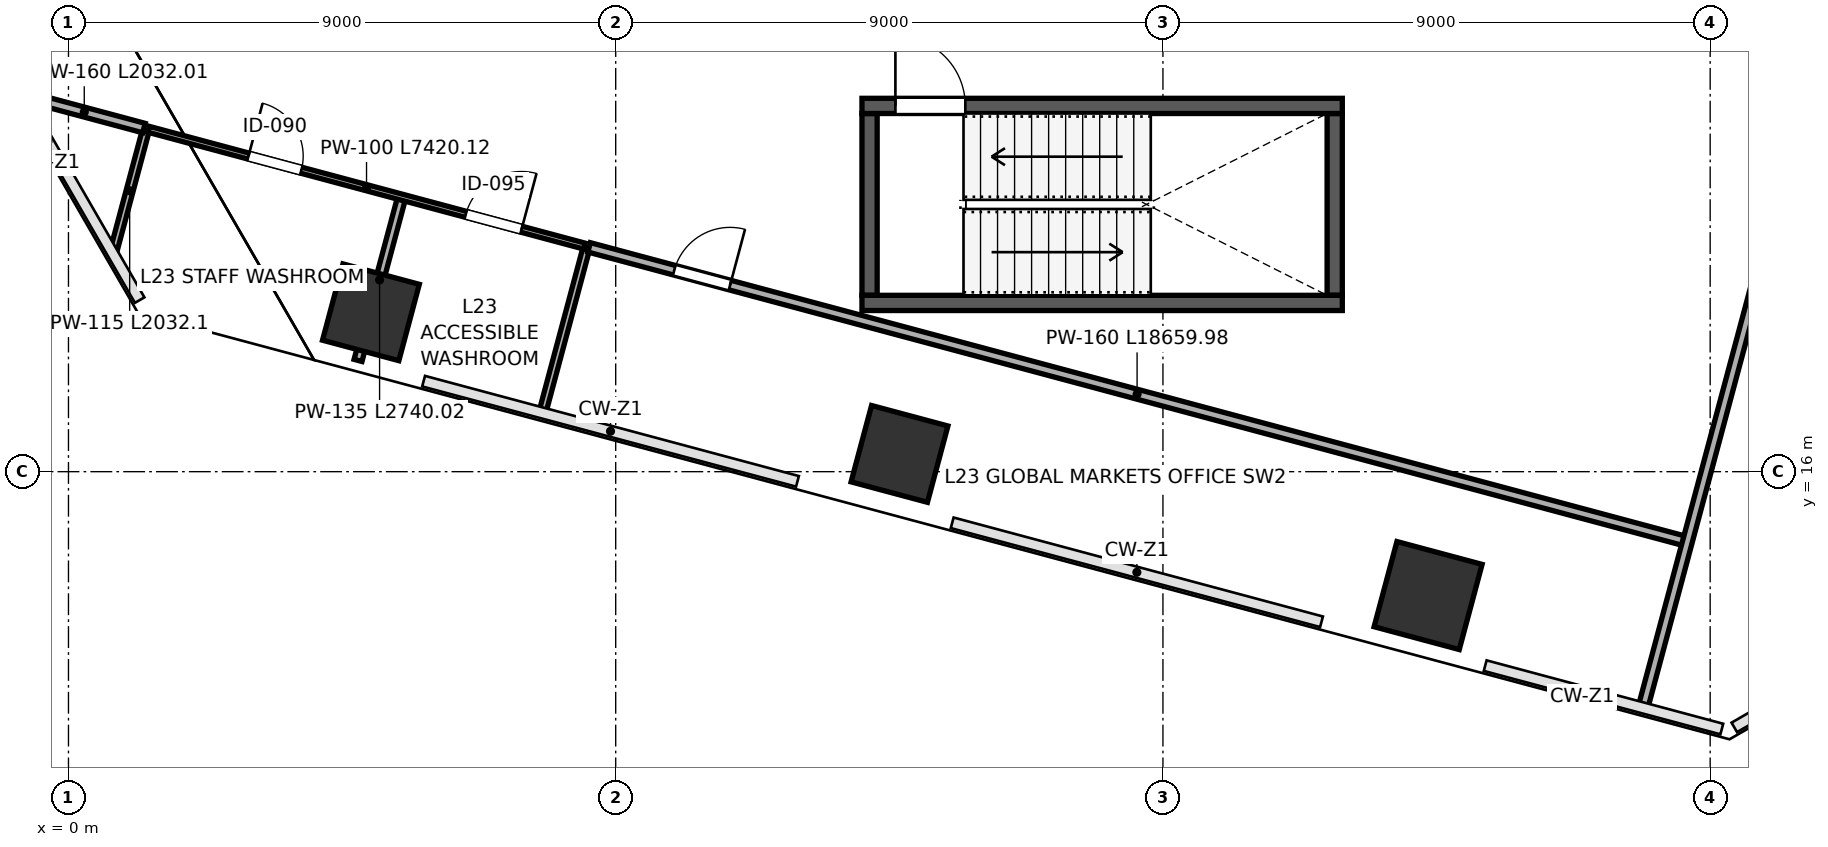
"""IFC4 building model, lengths in metres.
Left out: names, types, materials, properties, quantities, classifications, styles, units other than length and angle.
Written with IfcOpenShell. Run it as: python <this file> out.ifc"""

import sys

from ifc_helpers import new_model, si_unit, direction, frame, frame_2d, origin, origin_2d, place, context, subcontext, project, spatial, rectangle, extrude, clip, halfspace, source, transform, mapped, element, fill, save


model = new_model("IFC4")
c1 = context("Model", 3, precision=1e-05, world=origin(), true_north=direction((0.0, 1.0)))
c2 = subcontext(c1, "Body", "Model", "MODEL_VIEW")
j1 = project(units=[si_unit("LENGTHUNIT", "METRE"), si_unit("PLANEANGLEUNIT", "RADIAN")], contexts=[c1])
p1 = place(None, origin())
s1 = spatial("IfcSite", under=j1, at=p1, CompositionType="ELEMENT")
p2 = place(p1, origin())
s2 = spatial("IfcBuilding", under=s1, at=p2, CompositionType="ELEMENT")
p3 = place(p2, frame((0.0, 0.0, 104.2)))
s3 = spatial("IfcBuildingStorey", under=s2, at=p3, CompositionType="ELEMENT", Elevation=104.2)
p4 = place(p3, frame((4.974, 18.621, 0.0), z_axis=(-0.068120325532, 0.08608930029, 0.993955861004), x_axis=(0.917104606018, 0.397632779952, 0.028413270265)))
e1 = element("IfcColumn", 1, at=p4, inside=s3, PredefinedType="COLUMN", context=c2, shape_type="Clipping", body=[
    clip(clip(extrude(rectangle(XDim=1.3, YDim=1.3, at=origin_2d()), origin(), (0.0, 0.0, 1.0), 4.226), halfspace(frame((0.0, 0.0, 0.089), z_axis=(0.0, 0.0, -1.0), x_axis=(1.0, 0.0, 0.0)), False)), halfspace(frame((0.0, 0.0, 4.137), z_axis=(0.0, 0.0, 1.0), x_axis=(1.0, 0.0, 0.0)), False)),
])
p5 = place(p3, frame((13.667, 16.292, 0.0), z_axis=(-0.080755937676, 0.041391036156, 0.99587411888), x_axis=(0.669957556418, 0.742027795746, 0.023486654493)))
e2 = element("IfcColumn", 2, at=p5, inside=s3, PredefinedType="COLUMN", context=c2, shape_type="Clipping", body=[
    clip(clip(extrude(rectangle(XDim=1.3, YDim=1.3, at=origin_2d()), origin(), (0.0, 0.0, 1.0), 4.217), halfspace(frame((0.0, 0.0, 0.073), z_axis=(0.0, 0.0, -1.0), x_axis=(1.0, 0.0, 0.0)), False)), halfspace(frame((0.0, 0.0, 4.144), z_axis=(0.0, 0.0, 1.0), x_axis=(1.0, 0.0, 0.0)), False)),
])
p6 = place(p3, frame((22.361, 13.963, 0.0), z_axis=(-0.093295324518, -0.003472530689, 0.995632424117), x_axis=(0.221582622919, 0.974842179451, 0.024163327263)))
e3 = element("IfcColumn", 3, at=p6, inside=s3, PredefinedType="COLUMN", context=c2, shape_type="Clipping", body=[
    clip(clip(extrude(rectangle(XDim=1.45, YDim=1.45, at=origin_2d()), origin(), (0.0, 0.0, 1.0), 4.218), halfspace(frame((0.0, 0.0, 0.084), z_axis=(0.0, 0.0, -1.0), x_axis=(1.0, 0.0, 0.0)), False)), halfspace(frame((0.0, 0.0, 4.134), z_axis=(0.0, 0.0, 1.0), x_axis=(1.0, 0.0, 0.0)), False)),
])
for number, where, z_axis, x_axis in (
    (4, (13.175, 18.9, 0.0), (0.0, 0.0, 1.0), (0.0, 1.0, 0.0)),
    (5, (20.825, 18.9, 0.0), (0.0, 0.0, 1.0), (0.0, 1.0, 0.0)),
):
    element("IfcWall", number, at=place(p3, frame(where, z_axis=z_axis, x_axis=x_axis)), inside=s3, PredefinedType="SHEAR", context=c2, shape_type="SweptSolid", body=[
        extrude(rectangle(XDim=2.99, YDim=0.25, at=frame_2d((1.495, 0.0))), origin(), (0.0, 0.0, 1.0), 3.96),
    ])
p7 = place(p3, frame((13.05, 18.775, 0.0), z_axis=(0.0, 0.0, 1.0), x_axis=(1.0, 0.0, 0.0)))
e6 = element("IfcWall", 6, at=p7, inside=s3, PredefinedType="SHEAR", context=c2, shape_type="SweptSolid", body=[
    extrude(rectangle(XDim=7.9, YDim=0.25, at=frame_2d((3.95, 0.0))), origin(), (0.0, 0.0, 1.0), 3.96),
])
p8 = place(p3, frame((13.05, 22.015, 0.0), z_axis=(0.0, 0.0, 1.0), x_axis=(1.0, 0.0, 0.0)))
e7 = element("IfcWall", 7, at=p8, inside=s3, PredefinedType="SHEAR", context=c2, shape_type="SweptSolid", body=[
    extrude(rectangle(XDim=7.9, YDim=0.25, at=frame_2d((3.95, 0.0))), origin(), (0.0, 0.0, 1.0), 3.96),
])
p9 = place(p8, frame((0.55, 0.0, 0.0)))
e8 = element("IfcOpeningElement", 8, at=p9, cuts=e7, PredefinedType="OPENING", context=c2, shape_type="SweptSolid", body=[
    extrude(rectangle(XDim=1.15, YDim=2.2, at=frame_2d((0.575, 1.1))), frame((0.0, 0.135, 0.0), z_axis=(0.0, -1.0, 0.0), x_axis=(1.0, 0.0, 0.0)), (0.0, 0.0, 1.0), 0.27),
])
p10 = place(p3, frame((0.743, 19.639, 0.0), z_axis=(0.0, 0.0, 1.0), x_axis=(0.258784127083, 0.965935181868, 0.0)))
e9 = element("IfcWall", 9, at=p10, inside=s3, PredefinedType="PARTITIONING", context=c2, shape_type="SweptSolid", body=[
    extrude(rectangle(XDim=2.032, YDim=0.115, at=frame_2d((1.016, 0.0))), origin(), (0.0, 0.0, 1.0), 3.96),
])
p11 = place(p3, frame((-0.722, 22.177, 0.0), z_axis=(0.0, 0.0, 1.0), x_axis=(0.965965207833, -0.258672026426, 0.0)))
e10 = element("IfcWall", 10, at=p11, inside=s3, PredefinedType="PARTITIONING", context=c2, shape_type="SweptSolid", body=[
    extrude(rectangle(XDim=2.032, YDim=0.16, at=frame_2d((1.016, 0.0))), origin(), (0.0, 0.0, 1.0), 3.96),
])
p12 = place(p3, frame((4.762, 17.829, 0.0), z_axis=(0.0, 0.0, 1.0), x_axis=(0.25874944638, 0.965944472523, 0.0)))
e11 = element("IfcWall", 11, at=p12, inside=s3, PredefinedType="PARTITIONING", context=c2, shape_type="SweptSolid", body=[
    extrude(rectangle(XDim=2.74, YDim=0.135, at=frame_2d((1.37, 0.0))), origin(), (0.0, 0.0, 1.0), 3.095),
])
p13 = place(p3, frame((7.805, 17.014, 0.0), z_axis=(0.0, 0.0, 1.0), x_axis=(0.258832579125, 0.965922199757, 0.0)))
e12 = element("IfcWall", 12, at=p13, inside=s3, PredefinedType="PARTITIONING", context=c2, shape_type="SweptSolid", body=[
    extrude(rectangle(XDim=2.74, YDim=0.115, at=frame_2d((1.37, 0.0))), origin(), (0.0, 0.0, 1.0), 3.095),
])
p14 = place(p3, frame((1.318, 21.63, 0.0), z_axis=(0.0, 0.0, 1.0), x_axis=(0.965935568552, -0.258782683744, 0.0)))
e13 = element("IfcWall", 13, at=p14, inside=s3, PredefinedType="PARTITIONING", context=c2, shape_type="SweptSolid", body=[
    extrude(rectangle(XDim=7.42, YDim=0.1, at=frame_2d((3.71, 0.0))), origin(), (0.0, 0.0, 1.0), 3.96),
])
p15 = place(p14, frame((1.7, 0.0, 0.0)))
e14 = element("IfcOpeningElement", 14, at=p15, cuts=e13, PredefinedType="OPENING", context=c2, shape_type="SweptSolid", body=[
    extrude(rectangle(XDim=0.9, YDim=2.15, at=frame_2d((0.45, 1.075))), frame((0.0, 0.06, 0.0), z_axis=(0.0, -1.0, 0.0), x_axis=(1.0, 0.0, 0.0)), (0.0, 0.0, 1.0), 0.12),
])
p16 = place(p14, frame((5.4, 0.0, 0.0)))
e15 = element("IfcOpeningElement", 15, at=p16, cuts=e13, PredefinedType="OPENING", context=c2, shape_type="SweptSolid", body=[
    extrude(rectangle(XDim=0.95, YDim=2.15, at=frame_2d((0.475, 1.075))), frame((0.0, 0.06, 0.0), z_axis=(0.0, -1.0, 0.0), x_axis=(1.0, 0.0, 0.0)), (0.0, 0.0, 1.0), 0.12),
])
p17 = place(p3, frame((8.563, 19.689, 0.0), z_axis=(0.0, 0.0, 1.0), x_axis=(0.965928721089, -0.258808241319, 0.0)))
e16 = element("IfcWall", 16, at=p17, inside=s3, PredefinedType="PARTITIONING", context=c2, shape_type="SweptSolid", body=[
    extrude(rectangle(XDim=18.66, YDim=0.16, at=frame_2d((9.33, 0.0))), origin(), (0.0, 0.0, 1.0), 3.96),
])
p18 = place(p17, frame((1.45, 0.0, 0.0)))
e17 = element("IfcOpeningElement", 17, at=p18, cuts=e16, PredefinedType="OPENING", context=c2, shape_type="SweptSolid", body=[
    extrude(rectangle(XDim=0.95, YDim=2.15, at=frame_2d((0.475, 1.075))), frame((0.0, 0.09, 0.0), z_axis=(0.0, -1.0, 0.0), x_axis=(1.0, 0.0, 0.0)), (0.0, 0.0, 1.0), 0.18),
])
p19 = place(p3, frame((25.906, 12.164, 0.0), z_axis=(0.0, 0.0, 1.0), x_axis=(0.258805595447, 0.965929430013, 0.0)))
e18 = element("IfcWall", 18, at=p19, inside=s3, PredefinedType="PARTITIONING", context=c2, shape_type="SweptSolid", body=[
    extrude(rectangle(XDim=19.78, YDim=0.16, at=frame_2d((9.89, 0.0))), origin(), (0.0, 0.0, 1.0), 3.96),
])
m1 = source(origin(), c2, "Body", "SweptSolid", [
    extrude(rectangle(XDim=1.15, YDim=2.2, at=frame_2d((0.575, 1.1))), frame((0.0, 0.025, 0.0), z_axis=(0.0, -1.0, 0.0), x_axis=(1.0, 0.0, 0.0)), (0.0, 0.0, 1.0), 0.05),
])
p20 = place(p9, origin())
e19 = element("IfcDoor", 19, at=p20, inside=s3, OperationType="SINGLE_SWING_LEFT", PredefinedType="DOOR", context=c2, shape_type="MappedRepresentation", body=[
    mapped(m1, transform((0.0, 0.0, 0.0), scale=1.0)),
])
fill(e8, e19)
m2 = source(origin(), c2, "Body", "SweptSolid", [
    extrude(rectangle(XDim=0.9, YDim=2.15, at=frame_2d((0.45, 1.075))), frame((0.0, 0.025, 0.0), z_axis=(0.0, -1.0, 0.0), x_axis=(1.0, 0.0, 0.0)), (0.0, 0.0, 1.0), 0.05),
])
p21 = place(p15, origin())
e20 = element("IfcDoor", 20, at=p21, inside=s3, OperationType="SINGLE_SWING_LEFT", PredefinedType="DOOR", context=c2, shape_type="MappedRepresentation", body=[
    mapped(m2, transform((0.0, 0.0, 0.0), scale=1.0)),
])
fill(e14, e20)
m3 = source(origin(), c2, "Body", "SweptSolid", [
    extrude(rectangle(XDim=0.95, YDim=2.15, at=frame_2d((0.475, 1.075))), frame((0.0, 0.025, 0.0), z_axis=(0.0, -1.0, 0.0), x_axis=(1.0, 0.0, 0.0)), (0.0, 0.0, 1.0), 0.05),
])
p22 = place(p16, origin())
e21 = element("IfcDoor", 21, at=p22, inside=s3, OperationType="SINGLE_SWING_RIGHT", PredefinedType="DOOR", context=c2, shape_type="MappedRepresentation", body=[
    mapped(m3, transform((0.0, 0.0, 0.0), scale=1.0)),
])
fill(e15, e21)
m4 = source(origin(), c2, "Body", "SweptSolid", [
    extrude(rectangle(XDim=0.95, YDim=2.15, at=frame_2d((0.475, 1.075))), frame((0.0, 0.025, 0.0), z_axis=(0.0, -1.0, 0.0), x_axis=(1.0, 0.0, 0.0)), (0.0, 0.0, 1.0), 0.05),
])
p23 = place(p18, origin())
e22 = element("IfcDoor", 22, at=p23, inside=s3, OperationType="SINGLE_SWING_RIGHT", PredefinedType="DOOR", context=c2, shape_type="MappedRepresentation", body=[
    mapped(m4, transform((0.0, 0.0, 0.0), scale=1.0)),
])
fill(e17, e22)
save(model, sys.argv[1])
